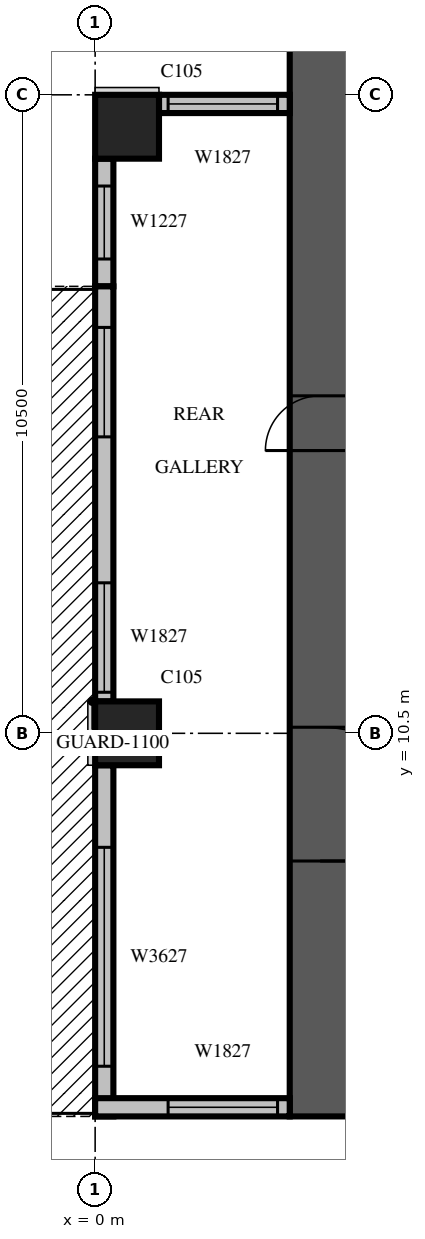
"""IFC4 building model, lengths in metres.
Left out: names, types, materials, properties, quantities, classifications, styles, units other than length and angle.
Written with IfcOpenShell. Run it as: python <this file> out.ifc"""

import sys

from ifc_helpers import new_model, si_unit, direction, frame, frame_2d, origin, origin_2d, place, context, subcontext, project, spatial, rectangle, extrude, source, transform, mapped, element, fill, save


model = new_model("IFC4")
c1 = context("Model", 3, precision=1e-05, world=origin(), true_north=direction((0.0, 1.0)))
c2 = subcontext(c1, "Body", "Model", "MODEL_VIEW")
j1 = project(units=[si_unit("LENGTHUNIT", "METRE"), si_unit("PLANEANGLEUNIT", "RADIAN")], contexts=[c1])
p1 = place(None, origin())
s1 = spatial("IfcSite", under=j1, at=p1, CompositionType="ELEMENT")
p2 = place(p1, origin())
s2 = spatial("IfcBuilding", under=s1, at=p2, CompositionType="ELEMENT")
p3 = place(p2, frame((0.0, 0.0, 116.1)))
s3 = spatial("IfcBuildingStorey", under=s2, at=p3, CompositionType="ELEMENT", Elevation=116.1)
m1 = source(origin(), c2, "Body", "SweptSolid", [
    extrude(rectangle(XDim=1.05, YDim=1.05, at=origin_2d()), origin(), (0.0, 0.0, 1.0), 4.2),
])
for number, where, z_axis, x_axis in (
    (1, (0.525, 10.5, 0.0), (0.0, 0.0, 1.0), (1.0, 0.0, 0.0)),
    (2, (0.525, 20.475, 0.0), (0.0, 0.0, 1.0), (1.0, 0.0, 0.0)),
):
    element("IfcColumn", number, at=place(p3, frame(where, z_axis=z_axis, x_axis=x_axis)), inside=s3, PredefinedType="COLUMN", context=c2, shape_type="MappedRepresentation", body=[
        mapped(m1, transform((0.0, 0.0, 0.0), scale=1.0)),
    ])
m2 = source(origin(), c2, "Body", "SweptSolid", [
    extrude(rectangle(XDim=17.8, YDim=1.0, at=frame_2d((8.9, 0.0))), origin(), (0.0, 0.0, 1.0), 4.2),
])
p4 = place(p3, frame((3.7, 4.2, 0.0), z_axis=(0.0, 0.0, 1.0), x_axis=(0.0, 1.0, 0.0)))
e3 = element("IfcWall", 3, at=p4, inside=s3, PredefinedType="SHEAR", context=c2, shape_type="MappedRepresentation", body=[
    mapped(m2, transform((0.0, 0.0, 0.0), scale=1.0)),
])
m3 = source(origin(), c2, "Body", "SweptSolid", [
    extrude(rectangle(XDim=2.2, YDim=2.1, at=frame_2d((1.1, 1.05))), frame((0.0, 0.51, 0.0), z_axis=(0.0, -1.0, 0.0), x_axis=(1.0, 0.0, 0.0)), (0.0, 0.0, 1.0), 1.02),
])
p5 = place(p4, frame((4.2, 0.0, 0.0)))
e4 = element("IfcOpeningElement", 4, at=p5, cuts=e3, PredefinedType="OPENING", context=c2, shape_type="MappedRepresentation", body=[
    mapped(m3, transform((0.0, 0.0, 0.0), scale=1.0)),
])
m4 = source(origin(), c2, "Body", "SweptSolid", [
    extrude(rectangle(XDim=0.9, YDim=2.1, at=frame_2d((0.45, 1.05))), frame((0.0, 0.51, 0.0), z_axis=(0.0, -1.0, 0.0), x_axis=(1.0, 0.0, 0.0)), (0.0, 0.0, 1.0), 1.02),
])
p6 = place(p4, frame((10.95, 0.0, 0.0)))
e5 = element("IfcOpeningElement", 5, at=p6, cuts=e3, PredefinedType="OPENING", context=c2, shape_type="MappedRepresentation", body=[
    mapped(m4, transform((0.0, 0.0, 0.0), scale=1.0)),
])
m5 = source(origin(), c2, "Body", "SweptSolid", [
    extrude(rectangle(XDim=2.15, YDim=0.3, at=frame_2d((1.075, 0.0))), origin(), (0.0, 0.0, 1.0), 3.8),
])
p7 = place(p3, frame((3.2, 20.85, 0.0), z_axis=(0.0, 0.0, 1.0), x_axis=(-1.0, 0.0, 0.0)))
e6 = element("IfcWall", 6, at=p7, inside=s3, PredefinedType="STANDARD", context=c2, shape_type="MappedRepresentation", body=[
    mapped(m5, transform((0.0, 0.0, 0.0), scale=1.0)),
])
m6 = source(origin(), c2, "Body", "SweptSolid", [
    extrude(rectangle(XDim=1.8, YDim=2.7, at=frame_2d((0.9, 1.35))), frame((0.0, 0.16, 0.0), z_axis=(0.0, -1.0, 0.0), x_axis=(1.0, 0.0, 0.0)), (0.0, 0.0, 1.0), 0.32),
])
p8 = place(p7, frame((0.2, 0.0, 0.6)))
e7 = element("IfcOpeningElement", 7, at=p8, cuts=e6, PredefinedType="OPENING", context=c2, shape_type="MappedRepresentation", body=[
    mapped(m6, transform((0.0, 0.0, 0.0), scale=1.0)),
])
m7 = source(origin(), c2, "Body", "SweptSolid", [
    extrude(rectangle(XDim=2.1, YDim=0.3, at=frame_2d((1.05, 0.0))), origin(), (0.0, 0.0, 1.0), 3.8),
])
p9 = place(p3, frame((0.15, 19.95, 0.0), z_axis=(0.0, 0.0, 1.0), x_axis=(0.0, -1.0, 0.0)))
e8 = element("IfcWall", 8, at=p9, inside=s3, PredefinedType="STANDARD", context=c2, shape_type="MappedRepresentation", body=[
    mapped(m7, transform((0.0, 0.0, 0.0), scale=1.0)),
])
m8 = source(origin(), c2, "Body", "SweptSolid", [
    extrude(rectangle(XDim=1.2, YDim=2.7, at=frame_2d((0.6, 1.35))), frame((0.0, 0.16, 0.0), z_axis=(0.0, -1.0, 0.0), x_axis=(1.0, 0.0, 0.0)), (0.0, 0.0, 1.0), 0.32),
])
p10 = place(p9, frame((0.45, 0.0, 0.6)))
e9 = element("IfcOpeningElement", 9, at=p10, cuts=e8, PredefinedType="OPENING", context=c2, shape_type="MappedRepresentation", body=[
    mapped(m8, transform((0.0, 0.0, 0.0), scale=1.0)),
])
m9 = source(origin(), c2, "Body", "SweptSolid", [
    extrude(rectangle(XDim=6.825, YDim=0.3, at=frame_2d((3.413, 0.0))), origin(), (0.0, 0.0, 1.0), 3.8),
])
p11 = place(p3, frame((0.15, 17.85, 0.0), z_axis=(0.0, 0.0, 1.0), x_axis=(0.0, -1.0, 0.0)))
e10 = element("IfcWall", 10, at=p11, inside=s3, PredefinedType="STANDARD", context=c2, shape_type="MappedRepresentation", body=[
    mapped(m9, transform((0.0, 0.0, 0.0), scale=1.0)),
])
m10 = source(origin(), c2, "Body", "SweptSolid", [
    extrude(rectangle(XDim=1.8, YDim=2.4, at=frame_2d((0.9, 1.2))), frame((0.0, 0.16, 0.0), z_axis=(0.0, -1.0, 0.0), x_axis=(1.0, 0.0, 0.0)), (0.0, 0.0, 1.0), 0.32),
])
p12 = place(p11, frame((0.675, 0.0, 0.0)))
e11 = element("IfcOpeningElement", 11, at=p12, cuts=e10, PredefinedType="OPENING", context=c2, shape_type="MappedRepresentation", body=[
    mapped(m10, transform((0.0, 0.0, 0.0), scale=1.0)),
])
p13 = place(p11, frame((4.875, 0.0, 0.6)))
e12 = element("IfcOpeningElement", 12, at=p13, cuts=e10, PredefinedType="OPENING", context=c2, shape_type="MappedRepresentation", body=[
    mapped(m6, transform((0.0, 0.0, 0.0), scale=1.0)),
])
m11 = source(origin(), c2, "Body", "SweptSolid", [
    extrude(rectangle(XDim=5.775, YDim=0.3, at=frame_2d((2.888, 0.0))), origin(), (0.0, 0.0, 1.0), 3.8),
])
p14 = place(p3, frame((0.15, 9.975, 0.0), z_axis=(0.0, 0.0, 1.0), x_axis=(0.0, -1.0, 0.0)))
e13 = element("IfcWall", 13, at=p14, inside=s3, PredefinedType="STANDARD", context=c2, shape_type="MappedRepresentation", body=[
    mapped(m11, transform((0.0, 0.0, 0.0), scale=1.0)),
])
m12 = source(origin(), c2, "Body", "SweptSolid", [
    extrude(rectangle(XDim=3.6, YDim=2.7, at=frame_2d((1.8, 1.35))), frame((0.0, 0.16, 0.0), z_axis=(0.0, -1.0, 0.0), x_axis=(1.0, 0.0, 0.0)), (0.0, 0.0, 1.0), 0.32),
])
p15 = place(p14, frame((1.35, 0.0, 0.6)))
e14 = element("IfcOpeningElement", 14, at=p15, cuts=e13, PredefinedType="OPENING", context=c2, shape_type="MappedRepresentation", body=[
    mapped(m12, transform((0.0, 0.0, 0.0), scale=1.0)),
])
m13 = source(origin(), c2, "Body", "SweptSolid", [
    extrude(rectangle(XDim=3.2, YDim=0.3, at=frame_2d((1.6, 0.0))), origin(), (0.0, 0.0, 1.0), 3.8),
])
p16 = place(p3, frame((0.0, 4.35, 0.0), z_axis=(0.0, 0.0, 1.0), x_axis=(1.0, 0.0, 0.0)))
e15 = element("IfcWall", 15, at=p16, inside=s3, PredefinedType="STANDARD", context=c2, shape_type="MappedRepresentation", body=[
    mapped(m13, transform((0.0, 0.0, 0.0), scale=1.0)),
])
p17 = place(p16, frame((1.2, 0.0, 0.6)))
e16 = element("IfcOpeningElement", 16, at=p17, cuts=e15, PredefinedType="OPENING", context=c2, shape_type="MappedRepresentation", body=[
    mapped(m6, transform((0.0, 0.0, 0.0), scale=1.0)),
])
m14 = source(origin(), c2, "Body", "SweptSolid", [
    extrude(rectangle(XDim=1.8, YDim=2.7, at=frame_2d((0.9, 1.35))), frame((0.0, 0.03, 0.0), z_axis=(0.0, -1.0, 0.0), x_axis=(1.0, 0.0, 0.0)), (0.0, 0.0, 1.0), 0.06),
])
p18 = place(p8, origin())
e17 = element("IfcWindow", 17, at=p18, inside=s3, PartitioningType="SINGLE_PANEL", PredefinedType="WINDOW", context=c2, shape_type="MappedRepresentation", body=[
    mapped(m14, transform((0.0, 0.0, 0.0), scale=1.0)),
])
fill(e7, e17)
m15 = source(origin(), c2, "Body", "SweptSolid", [
    extrude(rectangle(XDim=1.2, YDim=2.7, at=frame_2d((0.6, 1.35))), frame((0.0, 0.03, 0.0), z_axis=(0.0, -1.0, 0.0), x_axis=(1.0, 0.0, 0.0)), (0.0, 0.0, 1.0), 0.06),
])
p19 = place(p10, origin())
e18 = element("IfcWindow", 18, at=p19, inside=s3, PartitioningType="SINGLE_PANEL", PredefinedType="WINDOW", context=c2, shape_type="MappedRepresentation", body=[
    mapped(m15, transform((0.0, 0.0, 0.0), scale=1.0)),
])
fill(e9, e18)
m16 = source(origin(), c2, "Body", "SweptSolid", [
    extrude(rectangle(XDim=1.8, YDim=2.4, at=frame_2d((0.9, 1.2))), frame((0.0, 0.025, 0.0), z_axis=(0.0, -1.0, 0.0), x_axis=(1.0, 0.0, 0.0)), (0.0, 0.0, 1.0), 0.05),
])
p20 = place(p12, origin())
e19 = element("IfcDoor", 19, at=p20, inside=s3, OperationType="SLIDING_TO_LEFT", PredefinedType="DOOR", context=c2, shape_type="MappedRepresentation", body=[
    mapped(m16, transform((0.0, 0.0, 0.0), scale=1.0)),
])
fill(e11, e19)
p21 = place(p13, origin())
e20 = element("IfcWindow", 20, at=p21, inside=s3, PartitioningType="SINGLE_PANEL", PredefinedType="WINDOW", context=c2, shape_type="MappedRepresentation", body=[
    mapped(m14, transform((0.0, 0.0, 0.0), scale=1.0)),
])
fill(e12, e20)
m17 = source(origin(), c2, "Body", "SweptSolid", [
    extrude(rectangle(XDim=3.6, YDim=2.7, at=frame_2d((1.8, 1.35))), frame((0.0, 0.03, 0.0), z_axis=(0.0, -1.0, 0.0), x_axis=(1.0, 0.0, 0.0)), (0.0, 0.0, 1.0), 0.06),
])
p22 = place(p15, origin())
e21 = element("IfcWindow", 21, at=p22, inside=s3, PartitioningType="SINGLE_PANEL", PredefinedType="WINDOW", context=c2, shape_type="MappedRepresentation", body=[
    mapped(m17, transform((0.0, 0.0, 0.0), scale=1.0)),
])
fill(e14, e21)
p23 = place(p17, origin())
e22 = element("IfcWindow", 22, at=p23, inside=s3, PartitioningType="SINGLE_PANEL", PredefinedType="WINDOW", context=c2, shape_type="MappedRepresentation", body=[
    mapped(m14, transform((0.0, 0.0, 0.0), scale=1.0)),
])
fill(e16, e22)
m18 = source(origin(), c2, "Body", "SweptSolid", [
    extrude(rectangle(XDim=2.2, YDim=2.1, at=frame_2d((1.1, 1.05))), frame((0.0, 0.025, 0.0), z_axis=(0.0, -1.0, 0.0), x_axis=(1.0, 0.0, 0.0)), (0.0, 0.0, 1.0), 0.05),
])
p24 = place(p5, origin())
e23 = element("IfcDoor", 23, at=p24, inside=s3, OperationType="DOUBLE_DOOR_SINGLE_SWING", PredefinedType="DOOR", context=c2, shape_type="MappedRepresentation", body=[
    mapped(m18, transform((0.0, 0.0, 0.0), scale=1.0)),
])
fill(e4, e23)
m19 = source(origin(), c2, "Body", "SweptSolid", [
    extrude(rectangle(XDim=0.9, YDim=2.1, at=frame_2d((0.45, 1.05))), frame((0.0, 0.025, 0.0), z_axis=(0.0, -1.0, 0.0), x_axis=(1.0, 0.0, 0.0)), (0.0, 0.0, 1.0), 0.05),
])
p25 = place(p6, origin())
e24 = element("IfcDoor", 24, at=p25, inside=s3, OperationType="SINGLE_SWING_LEFT", PredefinedType="DOOR", context=c2, shape_type="MappedRepresentation", body=[
    mapped(m19, transform((0.0, 0.0, 0.0), scale=1.0)),
])
fill(e5, e24)
save(model, sys.argv[1])
